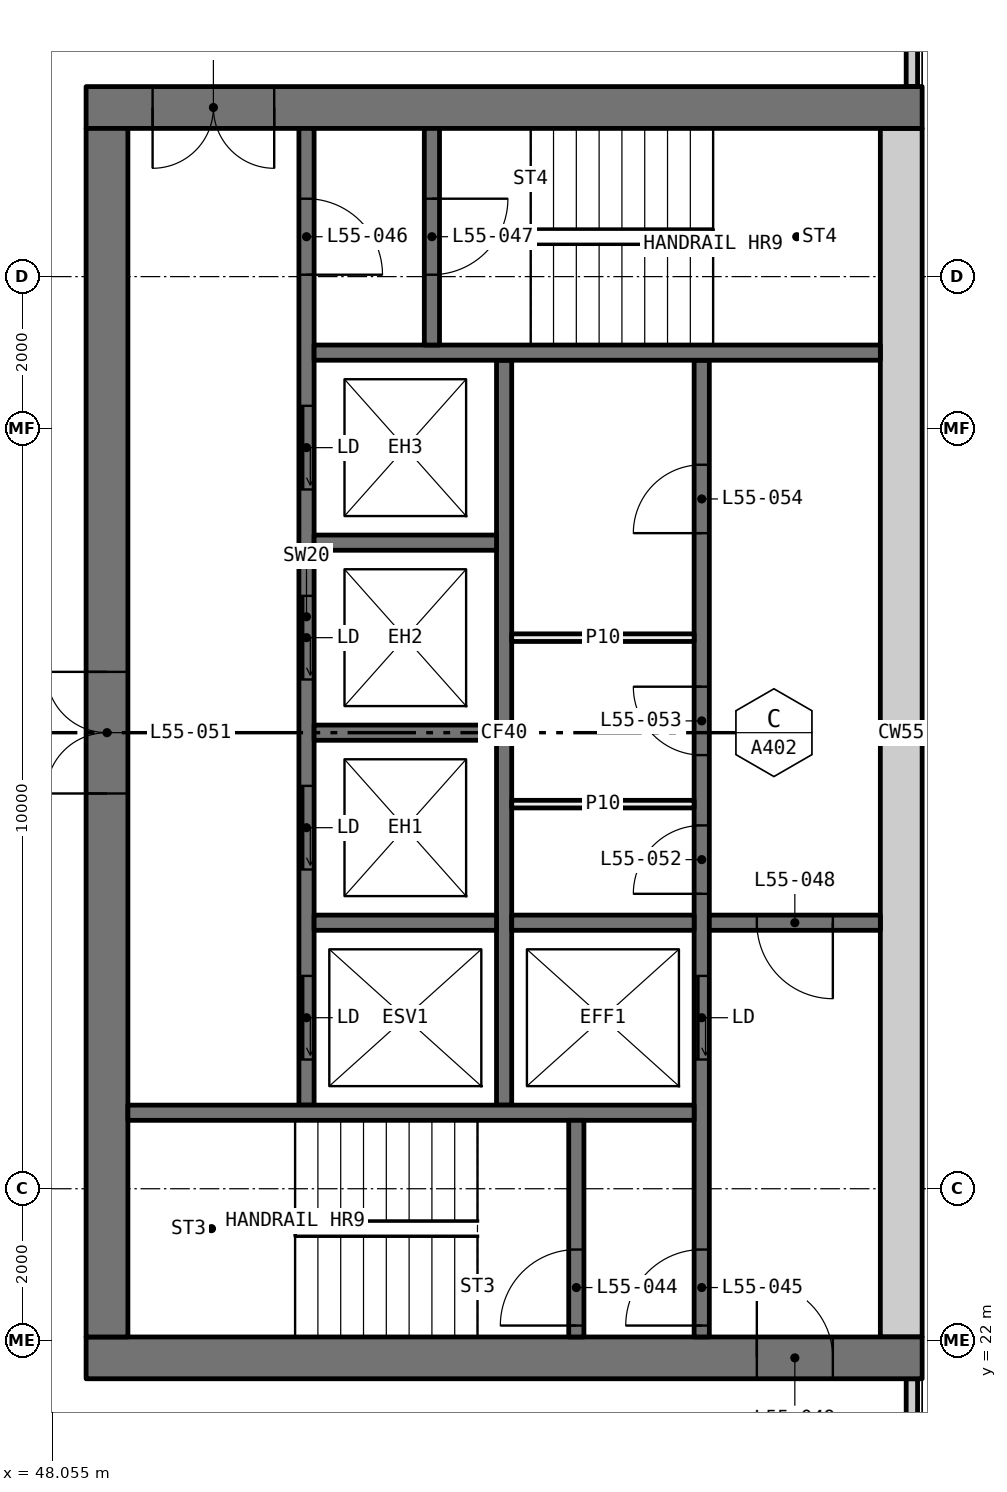
"""IFC4 building model, lengths in metres.
Left out: names, types, materials, properties, quantities, classifications, styles, units other than length and angle.
Written with IfcOpenShell. Run it as: python <this file> out.ifc"""

import sys

from ifc_helpers import new_model, si_unit, direction, frame, frame_2d, origin, place, context, subcontext, project, spatial, rectangle, extrude, element, fill, save


model = new_model("IFC4")
c1 = context("Model", 3, precision=1e-05, world=origin(), true_north=direction((0.0, 1.0)))
c2 = subcontext(c1, "Body", "Model", "MODEL_VIEW")
j1 = project(units=[si_unit("LENGTHUNIT", "METRE"), si_unit("PLANEANGLEUNIT", "RADIAN")], contexts=[c1])
p1 = place(None, origin())
s1 = spatial("IfcSite", under=j1, at=p1, CompositionType="ELEMENT")
p2 = place(p1, origin())
s2 = spatial("IfcBuilding", under=s1, at=p2, CompositionType="ELEMENT")
p3 = place(p2, frame((0.0, 0.0, 206.55)))
s3 = spatial("IfcBuildingStorey", under=s2, at=p3, CompositionType="ELEMENT", Elevation=206.55)
for number, where, z_axis, x_axis in (
    (1, (59.365, 18.71, 0.0), (0.0, 0.0, 1.0), (0.0, 1.0, 0.0)),
    (2, (59.365, 38.5, 0.0), (0.0, 0.0, 1.0), (0.0, 1.0, 0.0)),
):
    element("IfcWall", number, at=place(p3, frame(where, z_axis=z_axis, x_axis=x_axis)), inside=s3, PredefinedType="ELEMENTEDWALL", context=c2, shape_type="SweptSolid", body=[
        extrude(rectangle(XDim=2.79, YDim=0.15, at=frame_2d((1.395, 0.0))), origin(), (0.0, 0.0, 1.0), 3.05),
    ])
p4 = place(p3, frame((59.5, 21.775, 0.0), z_axis=(0.0, 0.0, 1.0), x_axis=(-1.0, 0.0, 0.0)))
e3 = element("IfcWall", 3, at=p4, inside=s3, PredefinedType="SHEAR", context=c2, shape_type="SweptSolid", body=[
    extrude(rectangle(XDim=11.0, YDim=0.55, at=frame_2d((5.5, 0.0))), origin(), (0.0, 0.0, 1.0), 3.05),
])
p5 = place(p4, frame((1.175, 0.0, 0.0)))
e4 = element("IfcOpeningElement", 4, at=p5, cuts=e3, PredefinedType="OPENING", context=c2, shape_type="SweptSolid", body=[
    extrude(rectangle(XDim=1.0, YDim=2.1, at=frame_2d((0.5, 1.05))), frame((0.0, 0.285, 0.0), z_axis=(0.0, -1.0, 0.0), x_axis=(1.0, 0.0, 0.0)), (0.0, 0.0, 1.0), 0.57),
])
p6 = place(p3, frame((59.5, 38.225, 0.0), z_axis=(0.0, 0.0, 1.0), x_axis=(-1.0, 0.0, 0.0)))
e5 = element("IfcWall", 5, at=p6, inside=s3, PredefinedType="SHEAR", context=c2, shape_type="SweptSolid", body=[
    extrude(rectangle(XDim=11.0, YDim=0.55, at=frame_2d((5.5, 0.0))), origin(), (0.0, 0.0, 1.0), 3.05),
])
p7 = place(p6, frame((8.525, 0.0, 0.0)))
e6 = element("IfcOpeningElement", 6, at=p7, cuts=e5, PredefinedType="OPENING", context=c2, shape_type="SweptSolid", body=[
    extrude(rectangle(XDim=1.6, YDim=2.1, at=frame_2d((0.8, 1.05))), frame((0.0, 0.285, 0.0), z_axis=(0.0, -1.0, 0.0), x_axis=(1.0, 0.0, 0.0)), (0.0, 0.0, 1.0), 0.57),
])
p8 = place(p3, frame((59.225, 22.05, 0.0), z_axis=(0.0, 0.0, 1.0), x_axis=(0.0, 1.0, 0.0)))
e7 = element("IfcWall", 7, at=p8, inside=s3, PredefinedType="SHEAR", context=c2, shape_type="SweptSolid", body=[
    extrude(rectangle(XDim=15.9, YDim=0.55, at=frame_2d((7.95, 0.0))), origin(), (0.0, 0.0, 1.0), 3.05),
])
p9 = place(p3, frame((48.775, 22.05, 0.0), z_axis=(0.0, 0.0, 1.0), x_axis=(0.0, 1.0, 0.0)))
e8 = element("IfcWall", 8, at=p9, inside=s3, PredefinedType="SHEAR", context=c2, shape_type="SweptSolid", body=[
    extrude(rectangle(XDim=15.9, YDim=0.55, at=frame_2d((7.95, 0.0))), origin(), (0.0, 0.0, 1.0), 3.05),
])
p10 = place(p9, frame((7.15, 0.0, 0.0)))
e9 = element("IfcOpeningElement", 9, at=p10, cuts=e8, PredefinedType="OPENING", context=c2, shape_type="SweptSolid", body=[
    extrude(rectangle(XDim=1.6, YDim=2.1, at=frame_2d((0.8, 1.05))), frame((0.0, 0.285, 0.0), z_axis=(0.0, -1.0, 0.0), x_axis=(1.0, 0.0, 0.0)), (0.0, 0.0, 1.0), 0.57),
])
p11 = place(p3, frame((56.6, 22.05, 0.0), z_axis=(0.0, 0.0, 1.0), x_axis=(0.0, 1.0, 0.0)))
e10 = element("IfcWall", 10, at=p11, inside=s3, PredefinedType="SOLIDWALL", context=c2, shape_type="SweptSolid", body=[
    extrude(rectangle(XDim=12.85, YDim=0.2, at=frame_2d((6.425, 0.0))), origin(), (0.0, 0.0, 1.0), 3.05),
])
p12 = place(p11, frame((3.65, 0.0, 0.0)))
e11 = element("IfcOpeningElement", 11, at=p12, cuts=e10, PredefinedType="OPENING", context=c2, shape_type="SweptSolid", body=[
    extrude(rectangle(XDim=1.1, YDim=2.1, at=frame_2d((0.55, 1.05))), frame((0.0, 0.11, 0.0), z_axis=(0.0, -1.0, 0.0), x_axis=(1.0, 0.0, 0.0)), (0.0, 0.0, 1.0), 0.22),
])
p13 = place(p11, frame((0.15, 0.0, 0.0)))
e12 = element("IfcOpeningElement", 12, at=p13, cuts=e10, PredefinedType="OPENING", context=c2, shape_type="SweptSolid", body=[
    extrude(rectangle(XDim=1.0, YDim=2.1, at=frame_2d((0.5, 1.05))), frame((0.0, 0.11, 0.0), z_axis=(0.0, -1.0, 0.0), x_axis=(1.0, 0.0, 0.0)), (0.0, 0.0, 1.0), 0.22),
])
p14 = place(p11, frame((5.83, 0.0, 0.0)))
e13 = element("IfcOpeningElement", 13, at=p14, cuts=e10, PredefinedType="OPENING", context=c2, shape_type="SweptSolid", body=[
    extrude(rectangle(XDim=0.9, YDim=2.1, at=frame_2d((0.45, 1.05))), frame((0.0, 0.11, 0.0), z_axis=(0.0, -1.0, 0.0), x_axis=(1.0, 0.0, 0.0)), (0.0, 0.0, 1.0), 0.22),
])
p15 = place(p11, frame((7.655, 0.0, 0.0)))
e14 = element("IfcOpeningElement", 14, at=p15, cuts=e10, PredefinedType="OPENING", context=c2, shape_type="SweptSolid", body=[
    extrude(rectangle(XDim=0.9, YDim=2.1, at=frame_2d((0.45, 1.05))), frame((0.0, 0.11, 0.0), z_axis=(0.0, -1.0, 0.0), x_axis=(1.0, 0.0, 0.0)), (0.0, 0.0, 1.0), 0.22),
])
p16 = place(p11, frame((10.575, 0.0, 0.0)))
e15 = element("IfcOpeningElement", 15, at=p16, cuts=e10, PredefinedType="OPENING", context=c2, shape_type="SweptSolid", body=[
    extrude(rectangle(XDim=0.9, YDim=2.1, at=frame_2d((0.45, 1.05))), frame((0.0, 0.11, 0.0), z_axis=(0.0, -1.0, 0.0), x_axis=(1.0, 0.0, 0.0)), (0.0, 0.0, 1.0), 0.22),
])
p17 = place(p3, frame((51.4, 25.1, 0.0), z_axis=(0.0, 0.0, 1.0), x_axis=(0.0, 1.0, 0.0)))
e16 = element("IfcWall", 16, at=p17, inside=s3, PredefinedType="SOLIDWALL", context=c2, shape_type="SweptSolid", body=[
    extrude(rectangle(XDim=12.85, YDim=0.2, at=frame_2d((6.425, 0.0))), origin(), (0.0, 0.0, 1.0), 3.05),
])
p18 = place(p17, frame((0.6, 0.0, 0.0)))
e17 = element("IfcOpeningElement", 17, at=p18, cuts=e16, PredefinedType="OPENING", context=c2, shape_type="SweptSolid", body=[
    extrude(rectangle(XDim=1.1, YDim=2.1, at=frame_2d((0.55, 1.05))), frame((0.0, 0.11, 0.0), z_axis=(0.0, -1.0, 0.0), x_axis=(1.0, 0.0, 0.0)), (0.0, 0.0, 1.0), 0.22),
])
p19 = place(p17, frame((3.1, 0.0, 0.0)))
e18 = element("IfcOpeningElement", 18, at=p19, cuts=e16, PredefinedType="OPENING", context=c2, shape_type="SweptSolid", body=[
    extrude(rectangle(XDim=1.1, YDim=2.1, at=frame_2d((0.55, 1.05))), frame((0.0, 0.11, 0.0), z_axis=(0.0, -1.0, 0.0), x_axis=(1.0, 0.0, 0.0)), (0.0, 0.0, 1.0), 0.22),
])
p20 = place(p17, frame((5.6, 0.0, 0.0)))
e19 = element("IfcOpeningElement", 19, at=p20, cuts=e16, PredefinedType="OPENING", context=c2, shape_type="SweptSolid", body=[
    extrude(rectangle(XDim=1.1, YDim=2.1, at=frame_2d((0.55, 1.05))), frame((0.0, 0.11, 0.0), z_axis=(0.0, -1.0, 0.0), x_axis=(1.0, 0.0, 0.0)), (0.0, 0.0, 1.0), 0.22),
])
p21 = place(p17, frame((8.1, 0.0, 0.0)))
e20 = element("IfcOpeningElement", 20, at=p21, cuts=e16, PredefinedType="OPENING", context=c2, shape_type="SweptSolid", body=[
    extrude(rectangle(XDim=1.1, YDim=2.1, at=frame_2d((0.55, 1.05))), frame((0.0, 0.11, 0.0), z_axis=(0.0, -1.0, 0.0), x_axis=(1.0, 0.0, 0.0)), (0.0, 0.0, 1.0), 0.22),
])
p22 = place(p17, frame((10.925, 0.0, 0.0)))
e21 = element("IfcOpeningElement", 21, at=p22, cuts=e16, PredefinedType="OPENING", context=c2, shape_type="SweptSolid", body=[
    extrude(rectangle(XDim=1.0, YDim=2.1, at=frame_2d((0.5, 1.05))), frame((0.0, 0.11, 0.0), z_axis=(0.0, -1.0, 0.0), x_axis=(1.0, 0.0, 0.0)), (0.0, 0.0, 1.0), 0.22),
])
p23 = place(p3, frame((54.0, 25.1, 0.0), z_axis=(0.0, 0.0, 1.0), x_axis=(0.0, 1.0, 0.0)))
e22 = element("IfcWall", 22, at=p23, inside=s3, PredefinedType="SOLIDWALL", context=c2, shape_type="SweptSolid", body=[
    extrude(rectangle(XDim=9.8, YDim=0.2, at=frame_2d((4.9, 0.0))), origin(), (0.0, 0.0, 1.0), 3.05),
])
for number, where, z_axis, x_axis in (
    (23, (56.5, 25.0, 0.0), (0.0, 0.0, 1.0), (-1.0, 0.0, 0.0)),
    (24, (58.95, 35.0, 0.0), (0.0, 0.0, 1.0), (-1.0, 0.0, 0.0)),
):
    element("IfcWall", number, at=place(p3, frame(where, z_axis=z_axis, x_axis=x_axis)), inside=s3, PredefinedType="SOLIDWALL", context=c2, shape_type="SweptSolid", body=[
        extrude(rectangle(XDim=7.45, YDim=0.2, at=frame_2d((3.725, 0.0))), origin(), (0.0, 0.0, 1.0), 3.05),
    ])
p24 = place(p3, frame((58.95, 27.5, 0.0), z_axis=(0.0, 0.0, 1.0), x_axis=(-1.0, 0.0, 0.0)))
e25 = element("IfcWall", 25, at=p24, inside=s3, PredefinedType="SOLIDWALL", context=c2, shape_type="SweptSolid", body=[
    extrude(rectangle(XDim=2.25, YDim=0.2, at=frame_2d((1.125, 0.0))), origin(), (0.0, 0.0, 1.0), 3.05),
])
p25 = place(p24, frame((0.625, 0.0, 0.0)))
e26 = element("IfcOpeningElement", 26, at=p25, cuts=e25, PredefinedType="OPENING", context=c2, shape_type="SweptSolid", body=[
    extrude(rectangle(XDim=1.0, YDim=2.1, at=frame_2d((0.5, 1.05))), frame((0.0, 0.11, 0.0), z_axis=(0.0, -1.0, 0.0), x_axis=(1.0, 0.0, 0.0)), (0.0, 0.0, 1.0), 0.22),
])
p26 = place(p3, frame((54.95, 22.05, 0.0), z_axis=(0.0, 0.0, 1.0), x_axis=(0.0, 1.0, 0.0)))
e27 = element("IfcWall", 27, at=p26, inside=s3, PredefinedType="SOLIDWALL", context=c2, shape_type="SweptSolid", body=[
    extrude(rectangle(XDim=2.85, YDim=0.2, at=frame_2d((1.425, 0.0))), origin(), (0.0, 0.0, 1.0), 3.05),
])
p27 = place(p26, frame((0.15, 0.0, 0.0)))
e28 = element("IfcOpeningElement", 28, at=p27, cuts=e27, PredefinedType="OPENING", context=c2, shape_type="SweptSolid", body=[
    extrude(rectangle(XDim=1.0, YDim=2.1, at=frame_2d((0.5, 1.05))), frame((0.0, 0.11, 0.0), z_axis=(0.0, -1.0, 0.0), x_axis=(1.0, 0.0, 0.0)), (0.0, 0.0, 1.0), 0.22),
])
p28 = place(p3, frame((53.05, 35.1, 0.0), z_axis=(0.0, 0.0, 1.0), x_axis=(0.0, 1.0, 0.0)))
e29 = element("IfcWall", 29, at=p28, inside=s3, PredefinedType="SOLIDWALL", context=c2, shape_type="SweptSolid", body=[
    extrude(rectangle(XDim=2.85, YDim=0.2, at=frame_2d((1.425, 0.0))), origin(), (0.0, 0.0, 1.0), 3.05),
])
p29 = place(p28, frame((0.925, 0.0, 0.0)))
e30 = element("IfcOpeningElement", 30, at=p29, cuts=e29, PredefinedType="OPENING", context=c2, shape_type="SweptSolid", body=[
    extrude(rectangle(XDim=1.0, YDim=2.1, at=frame_2d((0.5, 1.05))), frame((0.0, 0.11, 0.0), z_axis=(0.0, -1.0, 0.0), x_axis=(1.0, 0.0, 0.0)), (0.0, 0.0, 1.0), 0.22),
])
for number, where, z_axis, x_axis in (
    (31, (56.5, 27.5, 0.0), (0.0, 0.0, 1.0), (-1.0, 0.0, 0.0)),
    (32, (53.9, 27.5, 0.0), (0.0, 0.0, 1.0), (-1.0, 0.0, 0.0)),
    (33, (53.9, 30.0, 0.0), (0.0, 0.0, 1.0), (-1.0, 0.0, 0.0)),
    (34, (53.9, 32.5, 0.0), (0.0, 0.0, 1.0), (-1.0, 0.0, 0.0)),
):
    element("IfcWall", number, at=place(p3, frame(where, z_axis=z_axis, x_axis=x_axis)), inside=s3, PredefinedType="SOLIDWALL", context=c2, shape_type="SweptSolid", body=[
        extrude(rectangle(XDim=2.4, YDim=0.2, at=frame_2d((1.2, 0.0))), origin(), (0.0, 0.0, 1.0), 3.05),
    ])
for number, where, z_axis, x_axis in (
    (35, (56.5, 29.06, 0.0), (0.0, 0.0, 1.0), (-1.0, 0.0, 0.0)),
    (36, (56.5, 31.25, 0.0), (0.0, 0.0, 1.0), (-1.0, 0.0, 0.0)),
):
    element("IfcWall", number, at=place(p3, frame(where, z_axis=z_axis, x_axis=x_axis)), inside=s3, PredefinedType="PARTITIONING", context=c2, shape_type="SweptSolid", body=[
        extrude(rectangle(XDim=2.4, YDim=0.1, at=frame_2d((1.2, 0.0))), origin(), (0.0, 0.0, 1.0), 3.05),
    ])
p30 = place(p18, origin())
e37 = element("IfcDoor", 37, at=p30, inside=s3, OperationType="SLIDING_TO_LEFT", PredefinedType="DOOR", context=c2, shape_type="SweptSolid", body=[
    extrude(rectangle(XDim=1.1, YDim=2.1, at=frame_2d((0.55, 1.05))), frame((0.0, 0.025, 0.0), z_axis=(0.0, -1.0, 0.0), x_axis=(1.0, 0.0, 0.0)), (0.0, 0.0, 1.0), 0.05),
])
fill(e17, e37)
p31 = place(p19, origin())
e38 = element("IfcDoor", 38, at=p31, inside=s3, OperationType="SLIDING_TO_LEFT", PredefinedType="DOOR", context=c2, shape_type="SweptSolid", body=[
    extrude(rectangle(XDim=1.1, YDim=2.1, at=frame_2d((0.55, 1.05))), frame((0.0, 0.025, 0.0), z_axis=(0.0, -1.0, 0.0), x_axis=(1.0, 0.0, 0.0)), (0.0, 0.0, 1.0), 0.05),
])
fill(e18, e38)
p32 = place(p20, origin())
e39 = element("IfcDoor", 39, at=p32, inside=s3, OperationType="SLIDING_TO_LEFT", PredefinedType="DOOR", context=c2, shape_type="SweptSolid", body=[
    extrude(rectangle(XDim=1.1, YDim=2.1, at=frame_2d((0.55, 1.05))), frame((0.0, 0.025, 0.0), z_axis=(0.0, -1.0, 0.0), x_axis=(1.0, 0.0, 0.0)), (0.0, 0.0, 1.0), 0.05),
])
fill(e19, e39)
p33 = place(p21, origin())
e40 = element("IfcDoor", 40, at=p33, inside=s3, OperationType="SLIDING_TO_LEFT", PredefinedType="DOOR", context=c2, shape_type="SweptSolid", body=[
    extrude(rectangle(XDim=1.1, YDim=2.1, at=frame_2d((0.55, 1.05))), frame((0.0, 0.025, 0.0), z_axis=(0.0, -1.0, 0.0), x_axis=(1.0, 0.0, 0.0)), (0.0, 0.0, 1.0), 0.05),
])
fill(e20, e40)
p34 = place(p12, origin())
e41 = element("IfcDoor", 41, at=p34, inside=s3, OperationType="SLIDING_TO_LEFT", PredefinedType="DOOR", context=c2, shape_type="SweptSolid", body=[
    extrude(rectangle(XDim=1.1, YDim=2.1, at=frame_2d((0.55, 1.05))), frame((0.0, 0.025, 0.0), z_axis=(0.0, -1.0, 0.0), x_axis=(1.0, 0.0, 0.0)), (0.0, 0.0, 1.0), 0.05),
])
fill(e11, e41)
p35 = place(p27, origin())
e42 = element("IfcDoor", 42, at=p35, inside=s3, OperationType="SINGLE_SWING_RIGHT", PredefinedType="DOOR", context=c2, shape_type="SweptSolid", body=[
    extrude(rectangle(XDim=1.0, YDim=2.1, at=frame_2d((0.5, 1.05))), frame((0.0, 0.025, 0.0), z_axis=(0.0, -1.0, 0.0), x_axis=(1.0, 0.0, 0.0)), (0.0, 0.0, 1.0), 0.05),
])
fill(e28, e42)
p36 = place(p13, origin())
e43 = element("IfcDoor", 43, at=p36, inside=s3, OperationType="SINGLE_SWING_RIGHT", PredefinedType="DOOR", context=c2, shape_type="SweptSolid", body=[
    extrude(rectangle(XDim=1.0, YDim=2.1, at=frame_2d((0.5, 1.05))), frame((0.0, 0.025, 0.0), z_axis=(0.0, -1.0, 0.0), x_axis=(1.0, 0.0, 0.0)), (0.0, 0.0, 1.0), 0.05),
])
fill(e12, e43)
p37 = place(p22, frame((1.0, 0.0, 0.0), x_axis=(-1.0, 0.0, 0.0)))
e44 = element("IfcDoor", 44, at=p37, inside=s3, OperationType="SINGLE_SWING_LEFT", PredefinedType="DOOR", context=c2, shape_type="SweptSolid", body=[
    extrude(rectangle(XDim=1.0, YDim=2.1, at=frame_2d((0.5, 1.05))), frame((0.0, 0.025, 0.0), z_axis=(0.0, -1.0, 0.0), x_axis=(1.0, 0.0, 0.0)), (0.0, 0.0, 1.0), 0.05),
])
fill(e21, e44)
p38 = place(p29, frame((1.0, 0.0, 0.0), x_axis=(-1.0, 0.0, 0.0)))
e45 = element("IfcDoor", 45, at=p38, inside=s3, OperationType="SINGLE_SWING_RIGHT", PredefinedType="DOOR", context=c2, shape_type="SweptSolid", body=[
    extrude(rectangle(XDim=1.0, YDim=2.1, at=frame_2d((0.5, 1.05))), frame((0.0, 0.025, 0.0), z_axis=(0.0, -1.0, 0.0), x_axis=(1.0, 0.0, 0.0)), (0.0, 0.0, 1.0), 0.05),
])
fill(e30, e45)
p39 = place(p25, origin())
e46 = element("IfcDoor", 46, at=p39, inside=s3, OperationType="SINGLE_SWING_RIGHT", PredefinedType="DOOR", context=c2, shape_type="SweptSolid", body=[
    extrude(rectangle(XDim=1.0, YDim=2.1, at=frame_2d((0.5, 1.05))), frame((0.0, 0.025, 0.0), z_axis=(0.0, -1.0, 0.0), x_axis=(1.0, 0.0, 0.0)), (0.0, 0.0, 1.0), 0.05),
])
fill(e26, e46)
p40 = place(p5, frame((1.0, 0.0, 0.0), x_axis=(-1.0, 0.0, 0.0)))
e47 = element("IfcDoor", 47, at=p40, inside=s3, OperationType="SINGLE_SWING_RIGHT", PredefinedType="DOOR", context=c2, shape_type="SweptSolid", body=[
    extrude(rectangle(XDim=1.0, YDim=2.1, at=frame_2d((0.5, 1.05))), frame((0.0, 0.025, 0.0), z_axis=(0.0, -1.0, 0.0), x_axis=(1.0, 0.0, 0.0)), (0.0, 0.0, 1.0), 0.05),
])
fill(e4, e47)
p41 = place(p7, origin())
e48 = element("IfcDoor", 48, at=p41, inside=s3, OperationType="DOUBLE_DOOR_SINGLE_SWING", PredefinedType="DOOR", context=c2, shape_type="SweptSolid", body=[
    extrude(rectangle(XDim=1.6, YDim=2.1, at=frame_2d((0.8, 1.05))), frame((0.0, 0.025, 0.0), z_axis=(0.0, -1.0, 0.0), x_axis=(1.0, 0.0, 0.0)), (0.0, 0.0, 1.0), 0.05),
])
fill(e6, e48)
p42 = place(p10, origin())
e49 = element("IfcDoor", 49, at=p42, inside=s3, OperationType="DOUBLE_DOOR_SINGLE_SWING", PredefinedType="DOOR", context=c2, shape_type="SweptSolid", body=[
    extrude(rectangle(XDim=1.6, YDim=2.1, at=frame_2d((0.8, 1.05))), frame((0.0, 0.025, 0.0), z_axis=(0.0, -1.0, 0.0), x_axis=(1.0, 0.0, 0.0)), (0.0, 0.0, 1.0), 0.05),
])
fill(e9, e49)
p43 = place(p14, origin())
e50 = element("IfcDoor", 50, at=p43, inside=s3, OperationType="SINGLE_SWING_RIGHT", PredefinedType="DOOR", context=c2, shape_type="SweptSolid", body=[
    extrude(rectangle(XDim=0.9, YDim=2.1, at=frame_2d((0.45, 1.05))), frame((0.0, 0.025, 0.0), z_axis=(0.0, -1.0, 0.0), x_axis=(1.0, 0.0, 0.0)), (0.0, 0.0, 1.0), 0.05),
])
fill(e13, e50)
p44 = place(p15, origin())
e51 = element("IfcDoor", 51, at=p44, inside=s3, OperationType="SINGLE_SWING_LEFT", PredefinedType="DOOR", context=c2, shape_type="SweptSolid", body=[
    extrude(rectangle(XDim=0.9, YDim=2.1, at=frame_2d((0.45, 1.05))), frame((0.0, 0.025, 0.0), z_axis=(0.0, -1.0, 0.0), x_axis=(1.0, 0.0, 0.0)), (0.0, 0.0, 1.0), 0.05),
])
fill(e14, e51)
p45 = place(p16, origin())
e52 = element("IfcDoor", 52, at=p45, inside=s3, OperationType="SINGLE_SWING_RIGHT", PredefinedType="DOOR", context=c2, shape_type="SweptSolid", body=[
    extrude(rectangle(XDim=0.9, YDim=2.1, at=frame_2d((0.45, 1.05))), frame((0.0, 0.025, 0.0), z_axis=(0.0, -1.0, 0.0), x_axis=(1.0, 0.0, 0.0)), (0.0, 0.0, 1.0), 0.05),
])
fill(e15, e52)
save(model, sys.argv[1])
